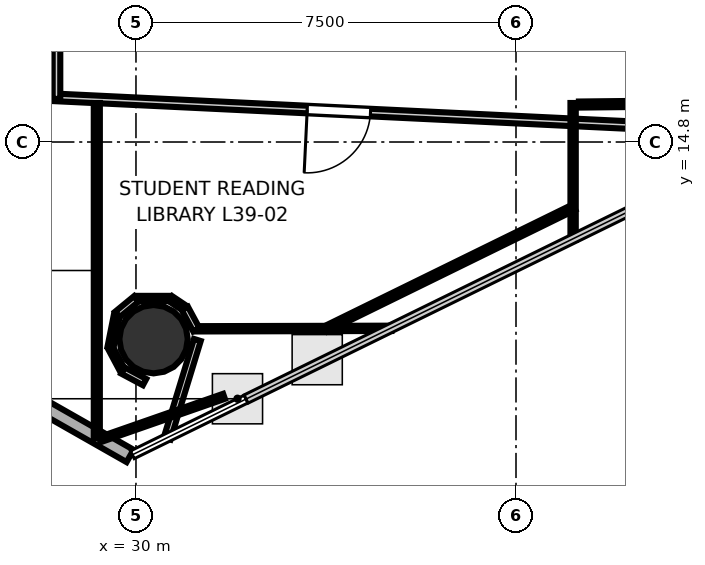
"""IFC4 building model, lengths in metres.
Left out: names, types, materials, properties, quantities, classifications, styles, units other than length and angle.
Written with IfcOpenShell. Run it as: python <this file> out.ifc"""

import sys

from ifc_helpers import new_model, si_unit, direction, frame, frame_2d, origin, origin_2d, place, context, subcontext, project, spatial, rectangle, hollow_circle, extrude, element, fill, save


model = new_model("IFC4")
c1 = context("Model", 3, precision=1e-05, world=origin(), true_north=direction((0.0, 1.0)))
c2 = subcontext(c1, "Body", "Model", "MODEL_VIEW")
j1 = project(units=[si_unit("LENGTHUNIT", "METRE"), si_unit("PLANEANGLEUNIT", "RADIAN")], contexts=[c1])
p1 = place(None, origin())
s1 = spatial("IfcSite", under=j1, at=p1, CompositionType="ELEMENT")
p2 = place(p1, origin())
s2 = spatial("IfcBuilding", under=s1, at=p2, CompositionType="ELEMENT")
p3 = place(p2, frame((0.0, 0.0, 155.0)))
s3 = spatial("IfcBuildingStorey", under=s2, at=p3, CompositionType="ELEMENT", Elevation=155.0)
p4 = place(p3, frame((30.347, 10.909, 0.0), z_axis=(0.0, 0.0, 1.0), x_axis=(1.0, 0.0, 0.0)))
e1 = element("IfcColumn", 1, at=p4, inside=s3, PredefinedType="COLUMN", context=c2, shape_type="SweptSolid", body=[
    extrude(hollow_circle(Radius=0.675, WallThickness=0.032, at=origin_2d()), origin(), (0.0, 0.0, 1.0), 3.7),
])
p5 = place(p3, frame((22.056, 13.056, 0.0), z_axis=(0.0, 0.0, 1.0), x_axis=(0.869262475314, -0.494350835956, 0.0)))
e2 = element("IfcWall", 2, at=p5, inside=s3, PredefinedType="SOLIDWALL", context=c2, shape_type="SweptSolid", body=[
    extrude(rectangle(XDim=9.004, YDim=0.28, at=frame_2d((4.502, 0.0))), origin(), (0.0, 0.0, 1.0), 3.52),
])
p6 = place(p5, frame((1.951, 0.0, 0.85)))
e3 = element("IfcOpeningElement", 3, at=p6, cuts=e2, PredefinedType="OPENING", context=c2, shape_type="SweptSolid", body=[
    extrude(rectangle(XDim=1.5, YDim=2.1, at=frame_2d((0.75, 1.05))), frame((0.0, 0.15, 0.0), z_axis=(0.0, -1.0, 0.0), x_axis=(1.0, 0.0, 0.0)), (0.0, 0.0, 1.0), 0.3),
])
p7 = place(p5, frame((5.553, 0.0, 0.85)))
e4 = element("IfcOpeningElement", 4, at=p7, cuts=e2, PredefinedType="OPENING", context=c2, shape_type="SweptSolid", body=[
    extrude(rectangle(XDim=1.5, YDim=2.1, at=frame_2d((0.75, 1.05))), frame((0.0, 0.15, 0.0), z_axis=(0.0, -1.0, 0.0), x_axis=(1.0, 0.0, 0.0)), (0.0, 0.0, 1.0), 0.3),
])
p8 = place(p3, frame((42.893, 14.982, 0.0), z_axis=(0.0, 0.0, 1.0), x_axis=(-0.9988389824, 0.048173511786, 0.0)))
e5 = element("IfcWall", 5, at=p8, inside=s3, PredefinedType="PARTITIONING", context=c2, shape_type="SweptSolid", body=[
    extrude(rectangle(XDim=14.51, YDim=0.15, at=frame_2d((7.255, 0.0))), origin(), (0.0, 0.0, 1.0), 2.84),
])
p9 = place(p8, frame((8.274, 0.0, 0.0)))
e6 = element("IfcOpeningElement", 6, at=p9, cuts=e5, PredefinedType="OPENING", context=c2, shape_type="SweptSolid", body=[
    extrude(rectangle(XDim=1.25, YDim=2.2, at=frame_2d((0.625, 1.1))), frame((0.0, 0.085, 0.0), z_axis=(0.0, -1.0, 0.0), x_axis=(1.0, 0.0, 0.0)), (0.0, 0.0, 1.0), 0.17),
])
p10 = place(p3, frame((28.431, 15.65, 0.0), z_axis=(0.0, 0.0, 1.0), x_axis=(0.0, 1.0, 0.0)))
e7 = element("IfcWall", 7, at=p10, inside=s3, PredefinedType="PARTITIONING", context=c2, shape_type="SweptSolid", body=[
    extrude(rectangle(XDim=2.4, YDim=0.15, at=frame_2d((1.2, 0.0))), origin(), (0.0, 0.0, 1.0), 2.84),
])
p11 = place(p3, frame((29.227, 15.57, 0.0), z_axis=(0.0, 0.0, 1.0), x_axis=(0.0, -1.0, 0.0)))
e8 = element("IfcWall", 8, at=p11, inside=s3, PredefinedType="PARTITIONING", context=c2, shape_type="SweptSolid", body=[
    extrude(rectangle(XDim=6.612, YDim=0.12, at=frame_2d((3.306, 0.0))), origin(), (0.0, 0.0, 1.0), 2.84),
])
p12 = place(p3, frame((38.644, 13.513, 0.0), z_axis=(0.0, 0.0, 1.0), x_axis=(-0.897915162587, -0.440168559526, 0.0)))
e9 = element("IfcWall", 9, at=p12, inside=s3, PredefinedType="PARTITIONING", context=c2, shape_type="SweptSolid", body=[
    extrude(rectangle(XDim=5.445, YDim=0.12, at=frame_2d((2.722, 0.0))), origin(), (0.0, 0.0, 1.0), 2.84),
])
p13 = place(p3, frame((35.04, 11.123, 0.0), z_axis=(0.0, 0.0, 1.0), x_axis=(-0.999996828806, -0.00251840793, 0.0)))
e10 = element("IfcWall", 10, at=p13, inside=s3, PredefinedType="PARTITIONING", context=c2, shape_type="SweptSolid", body=[
    extrude(rectangle(XDim=3.878, YDim=0.105, at=frame_2d((1.939, 0.0))), origin(), (0.0, 0.0, 1.0), 2.84),
])
p14 = place(p3, frame((31.19, 11.097, 0.0), z_axis=(0.0, 0.0, 1.0), x_axis=(-0.475420071565, 0.879758918996, 0.0)))
e11 = element("IfcWall", 11, at=p14, inside=s3, PredefinedType="PARTITIONING", context=c2, shape_type="SweptSolid", body=[
    extrude(rectangle(XDim=0.474, YDim=0.14, at=frame_2d((0.237, 0.0))), origin(), (0.0, 0.0, 1.0), 2.84),
])
p15 = place(p3, frame((30.955, 11.525, 0.0), z_axis=(0.0, 0.0, 1.0), x_axis=(-0.831126758744, 0.556083007203, 0.0)))
e12 = element("IfcWall", 12, at=p15, inside=s3, PredefinedType="PARTITIONING", context=c2, shape_type="SweptSolid", body=[
    extrude(rectangle(XDim=0.326, YDim=0.12, at=frame_2d((0.163, 0.0))), origin(), (0.0, 0.0, 1.0), 2.84),
])
p16 = place(p3, frame((30.667, 11.711, 0.0), z_axis=(0.0, 0.0, 1.0), x_axis=(-1.0, 0.0, 0.0)))
e13 = element("IfcWall", 13, at=p16, inside=s3, PredefinedType="PARTITIONING", context=c2, shape_type="SweptSolid", body=[
    extrude(rectangle(XDim=0.639, YDim=0.105, at=frame_2d((0.319, 0.0))), origin(), (0.0, 0.0, 1.0), 2.84),
])
p17 = place(p3, frame((30.008, 11.704, 0.0), z_axis=(0.0, 0.0, 1.0), x_axis=(-0.773193692611, -0.634169940715, 0.0)))
e14 = element("IfcWall", 14, at=p17, inside=s3, PredefinedType="PARTITIONING", context=c2, shape_type="SweptSolid", body=[
    extrude(rectangle(XDim=0.485, YDim=0.14, at=frame_2d((0.242, 0.0))), origin(), (0.0, 0.0, 1.0), 2.84),
])
p18 = place(p3, frame((29.622, 11.379, 0.0), z_axis=(0.0, 0.0, 1.0), x_axis=(-0.195234371211, -0.98075661624, 0.0)))
e15 = element("IfcWall", 15, at=p18, inside=s3, PredefinedType="PARTITIONING", context=c2, shape_type="SweptSolid", body=[
    extrude(rectangle(XDim=0.639, YDim=0.12, at=frame_2d((0.319, 0.0))), origin(), (0.0, 0.0, 1.0), 2.84),
])
p19 = place(p3, frame((29.501, 10.731, 0.0), z_axis=(0.0, 0.0, 1.0), x_axis=(0.471424550379, -0.88190639713, 0.0)))
e16 = element("IfcWall", 16, at=p19, inside=s3, PredefinedType="PARTITIONING", context=c2, shape_type="SweptSolid", body=[
    extrude(rectangle(XDim=0.485, YDim=0.105, at=frame_2d((0.242, 0.0))), origin(), (0.0, 0.0, 1.0), 2.84),
])
p20 = place(p3, frame((29.742, 10.291, 0.0), z_axis=(0.0, 0.0, 1.0), x_axis=(0.88190639713, -0.471424550379, 0.0)))
e17 = element("IfcWall", 17, at=p20, inside=s3, PredefinedType="PARTITIONING", context=c2, shape_type="SweptSolid", body=[
    extrude(rectangle(XDim=0.485, YDim=0.14, at=frame_2d((0.242, 0.0))), origin(), (0.0, 0.0, 1.0), 2.84),
])
p21 = place(p3, frame((30.615, 8.948, 0.0), z_axis=(0.0, 0.0, 1.0), x_axis=(0.292812756938, 0.956169801538, 0.0)))
e18 = element("IfcWall", 18, at=p21, inside=s3, PredefinedType="PARTITIONING", context=c2, shape_type="SweptSolid", body=[
    extrude(rectangle(XDim=2.035, YDim=0.14, at=frame_2d((1.018, 0.0))), origin(), (0.0, 0.0, 1.0), 2.84),
])
p22 = place(p3, frame((31.737, 9.781, 0.0), z_axis=(0.0, 0.0, 1.0), x_axis=(-0.94416141108, -0.329483277007, 0.0)))
e19 = element("IfcWall", 19, at=p22, inside=s3, PredefinedType="PARTITIONING", context=c2, shape_type="SweptSolid", body=[
    extrude(rectangle(XDim=2.596, YDim=0.105, at=frame_2d((1.298, 0.0))), origin(), (0.0, 0.0, 1.0), 2.84),
])
p23 = place(p3, frame((38.627, 15.57, 0.0), z_axis=(0.0, 0.0, 1.0), x_axis=(0.0, -1.0, 0.0)))
e20 = element("IfcWall", 20, at=p23, inside=s3, PredefinedType="PARTITIONING", context=c2, shape_type="SweptSolid", body=[
    extrude(rectangle(XDim=2.699, YDim=0.105, at=frame_2d((1.35, 0.0))), origin(), (0.0, 0.0, 1.0), 2.84),
])
p24 = place(p3, frame((38.742, 15.539, 0.0), z_axis=(0.0, 0.0, 1.0), x_axis=(0.999940745371, 0.010886034477, 0.0)))
e21 = element("IfcWall", 21, at=p24, inside=s3, PredefinedType="PARTITIONING", context=c2, shape_type="SweptSolid", body=[
    extrude(rectangle(XDim=5.427, YDim=0.12, at=frame_2d((2.714, 0.0))), origin(), (0.0, 0.0, 1.0), 2.84),
])
p25 = place(p9, origin())
e22 = element("IfcDoor", 22, at=p25, inside=s3, OperationType="SINGLE_SWING_RIGHT", PredefinedType="DOOR", context=c2, shape_type="SweptSolid", body=[
    extrude(rectangle(XDim=1.25, YDim=2.2, at=frame_2d((0.625, 1.1))), frame((0.0, 0.025, 0.0), z_axis=(0.0, -1.0, 0.0), x_axis=(1.0, 0.0, 0.0)), (0.0, 0.0, 1.0), 0.05),
])
fill(e6, e22)
save(model, sys.argv[1])
